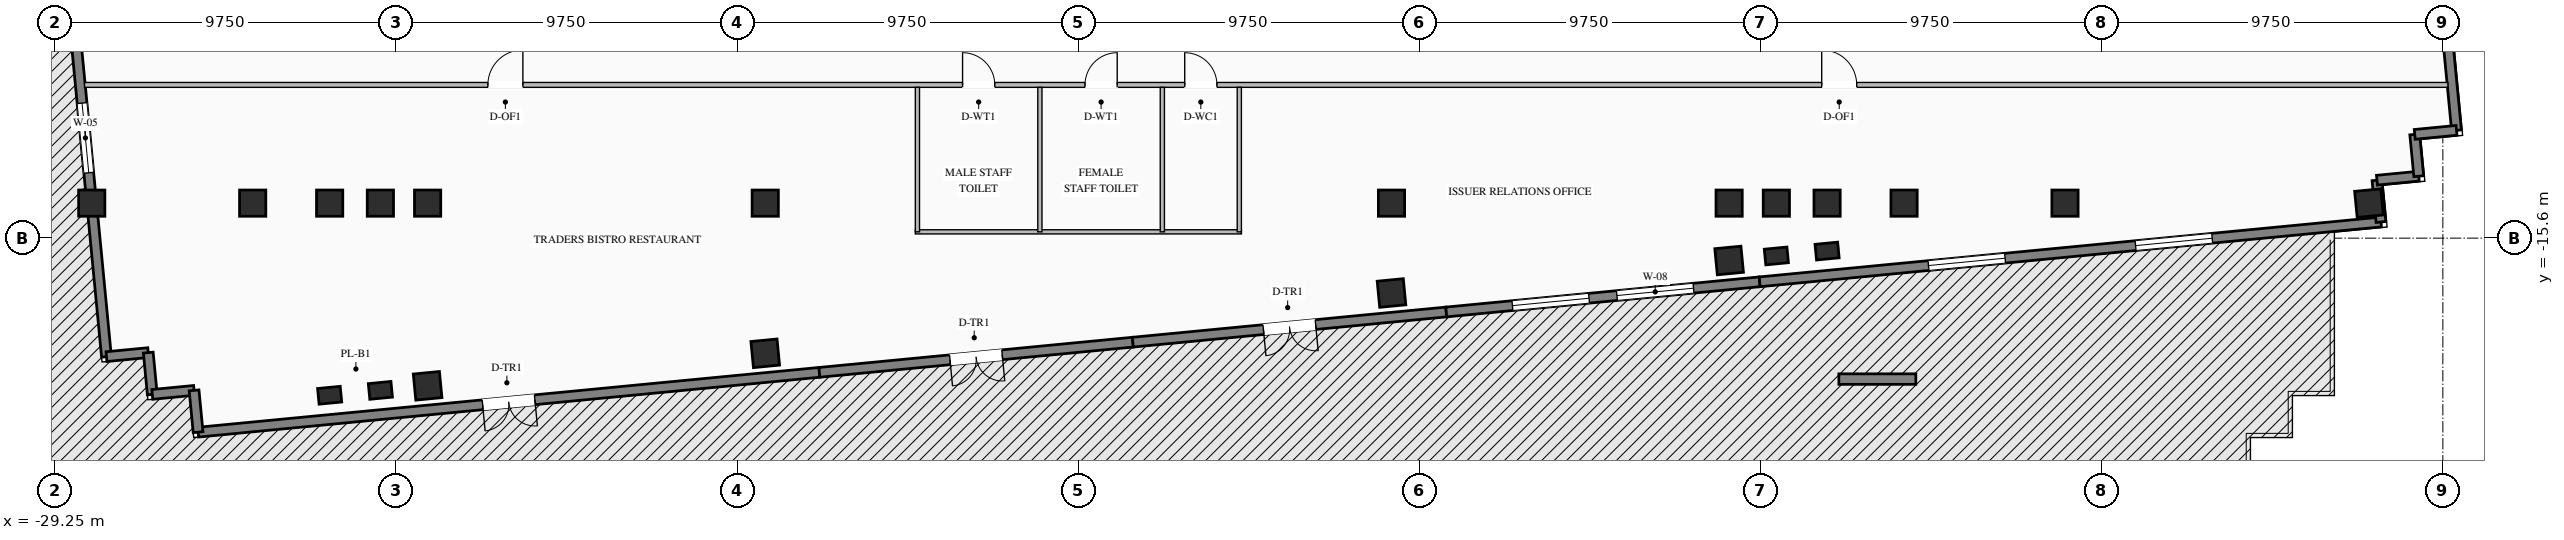
"""IFC4 building model, lengths in metres.
Left out: names, types, materials, properties, quantities, classifications, styles, units other than length and angle.
Written with IfcOpenShell. Run it as: python <this file> out.ifc"""

import sys

from ifc_helpers import new_model, si_unit, direction, frame, frame_2d, origin, origin_2d, place, context, subcontext, project, spatial, rectangle, i_section, extrude, element, fill, save


model = new_model("IFC4")
c1 = context("Model", 3, precision=1e-05, world=origin(), true_north=direction((0.0, 1.0)))
c2 = subcontext(c1, "Body", "Model", "MODEL_VIEW")
j1 = project(units=[si_unit("LENGTHUNIT", "METRE"), si_unit("PLANEANGLEUNIT", "RADIAN")], contexts=[c1])
p1 = place(None, origin())
s1 = spatial("IfcSite", under=j1, at=p1, CompositionType="ELEMENT")
p2 = place(p1, origin())
s2 = spatial("IfcBuilding", under=s1, at=p2, CompositionType="ELEMENT")
p3 = place(p2, frame((0.0, 0.0, 70.0)))
s3 = spatial("IfcBuildingStorey", under=s2, at=p3, CompositionType="ELEMENT", Elevation=70.0)
for number, where, z_axis, x_axis in (
    (1, (-21.4, -14.6, 0.0), (0.0, 0.0, 1.0), (1.0, 0.0, 0.0)),
    (2, (-19.95, -14.6, 0.0), (0.0, 0.0, 1.0), (1.0, 0.0, 0.0)),
    (3, (-18.6, -14.6, 0.0), (0.0, 0.0, 1.0), (1.0, 0.0, 0.0)),
    (4, (-8.95, -14.6, 0.0), (0.0, 0.0, 1.0), (1.0, 0.0, 0.0)),
    (5, (8.95, -14.6, 0.0), (0.0, 0.0, 1.0), (1.0, 0.0, 0.0)),
    (6, (18.6, -14.6, 0.0), (0.0, 0.0, 1.0), (1.0, 0.0, 0.0)),
    (7, (19.95, -14.6, 0.0), (0.0, 0.0, 1.0), (1.0, 0.0, 0.0)),
    (8, (21.4, -14.6, 0.0), (0.0, 0.0, 1.0), (1.0, 0.0, 0.0)),
    (9, (-23.6, -14.6, 0.0), (0.0, 0.0, 1.0), (1.0, 0.0, 0.0)),
    (10, (23.6, -14.6, 0.0), (0.0, 0.0, 1.0), (1.0, 0.0, 0.0)),
    (11, (-28.2, -14.6, 0.0), (0.0, 0.0, 1.0), (1.0, 0.0, 0.0)),
    (12, (28.2, -14.6, 0.0), (0.0, 0.0, 1.0), (1.0, 0.0, 0.0)),
):
    element("IfcColumn", number, at=place(p3, frame(where, z_axis=z_axis, x_axis=x_axis)), inside=s3, PredefinedType="COLUMN", context=c2, shape_type="SweptSolid", body=[
        extrude(i_section(OverallWidth=0.75, OverallDepth=0.75, WebThickness=0.03, FlangeThickness=0.044, at=origin_2d()), origin(), (0.0, 0.0, 1.0), 4.2),
    ])
for number, where, z_axis, x_axis in (
    (13, (-18.6, -19.821, -0.28), (0.0, 0.0, 1.0), (0.995, 0.096, 0.0)),
    (14, (-8.95, -18.892, -0.28), (0.0, 0.0, 1.0), (0.995, 0.096, 0.0)),
    (15, (8.95, -17.168, -0.28), (0.0, 0.0, 1.0), (0.995, 0.096, 0.0)),
    (16, (18.6, -16.239, -0.28), (0.0, 0.0, 1.0), (0.995, 0.096, 0.0)),
    (17, (36.888, -14.6, -0.28), (0.0, 0.0, 1.0), (0.995, 0.096, 0.0)),
):
    element("IfcColumn", number, at=place(p3, frame(where, z_axis=z_axis, x_axis=x_axis)), inside=s3, PredefinedType="COLUMN", context=c2, shape_type="SweptSolid", body=[
        extrude(i_section(OverallWidth=0.75, OverallDepth=0.75, WebThickness=0.03, FlangeThickness=0.044, at=origin_2d()), origin(), (0.0, 0.0, 1.0), 4.48),
    ])
for number, where, z_axis, x_axis in (
    (18, (-21.4, -20.091, -0.28), (0.0, 0.0, 1.0), (0.995, 0.096, 0.0)),
    (19, (-19.95, -19.951, -0.28), (0.0, 0.0, 1.0), (0.995, 0.096, 0.0)),
    (20, (19.95, -16.109, -0.28), (0.0, 0.0, 1.0), (0.995, 0.096, 0.0)),
    (21, (21.4, -15.969, -0.28), (0.0, 0.0, 1.0), (0.995, 0.096, 0.0)),
):
    element("IfcColumn", number, at=place(p3, frame(where, z_axis=z_axis, x_axis=x_axis)), inside=s3, PredefinedType="PILASTER", context=c2, shape_type="SweptSolid", body=[
        extrude(rectangle(XDim=0.65, YDim=0.45, at=origin_2d()), origin(), (0.0, 0.0, 1.0), 4.48),
    ])
p4 = place(p3, frame((-7.402, -19.436, 0.0), z_axis=(0.0, 0.0, 1.0), x_axis=(-0.995395780835, -0.095850088663, 0.0)))
e22 = element("IfcWall", 22, at=p4, inside=s3, PredefinedType="STANDARD", context=c2, shape_type="SweptSolid", body=[
    extrude(rectangle(XDim=17.84, YDim=0.28, at=frame_2d((8.92, 0.0))), origin(), (0.0, 0.0, 1.0), 4.0),
])
p5 = place(p4, frame((8.17, 0.0, 0.0)))
e23 = element("IfcOpeningElement", 23, at=p5, cuts=e22, PredefinedType="OPENING", context=c2, shape_type="SweptSolid", body=[
    extrude(rectangle(XDim=1.5, YDim=2.15, at=frame_2d((0.75, 1.075))), frame((0.0, 0.15, 0.0), z_axis=(0.0, -1.0, 0.0), x_axis=(1.0, 0.0, 0.0)), (0.0, 0.0, 1.0), 0.3),
])
p6 = place(p3, frame((1.556, -18.573, 0.0), z_axis=(0.0, 0.0, 1.0), x_axis=(-0.995396794462, -0.09583956164, 0.0)))
e24 = element("IfcWall", 24, at=p6, inside=s3, PredefinedType="STANDARD", context=c2, shape_type="SweptSolid", body=[
    extrude(rectangle(XDim=9.0, YDim=0.28, at=frame_2d((4.5, 0.0))), origin(), (0.0, 0.0, 1.0), 4.0),
])
p7 = place(p6, frame((3.75, 0.0, 0.0)))
e25 = element("IfcOpeningElement", 25, at=p7, cuts=e24, PredefinedType="OPENING", context=c2, shape_type="SweptSolid", body=[
    extrude(rectangle(XDim=1.5, YDim=2.15, at=frame_2d((0.75, 1.075))), frame((0.0, 0.15, 0.0), z_axis=(0.0, -1.0, 0.0), x_axis=(1.0, 0.0, 0.0)), (0.0, 0.0, 1.0), 0.3),
])
p8 = place(p3, frame((10.515, -17.711, 0.0), z_axis=(0.0, 0.0, 1.0), x_axis=(-0.995397043619, -0.095836973841, 0.0)))
e26 = element("IfcWall", 26, at=p8, inside=s3, PredefinedType="STANDARD", context=c2, shape_type="SweptSolid", body=[
    extrude(rectangle(XDim=9.0, YDim=0.28, at=frame_2d((4.5, 0.0))), origin(), (0.0, 0.0, 1.0), 4.0),
])
p9 = place(p8, frame((3.75, 0.0, 0.0)))
e27 = element("IfcOpeningElement", 27, at=p9, cuts=e26, PredefinedType="OPENING", context=c2, shape_type="SweptSolid", body=[
    extrude(rectangle(XDim=1.5, YDim=2.15, at=frame_2d((0.75, 1.075))), frame((0.0, 0.15, 0.0), z_axis=(0.0, -1.0, 0.0), x_axis=(1.0, 0.0, 0.0)), (0.0, 0.0, 1.0), 0.3),
])
p10 = place(p3, frame((19.474, -16.848, 0.0), z_axis=(0.0, 0.0, 1.0), x_axis=(-0.995396794462, -0.09583956164, 0.0)))
e28 = element("IfcWall", 28, at=p10, inside=s3, PredefinedType="STANDARD", context=c2, shape_type="SweptSolid", body=[
    extrude(rectangle(XDim=9.0, YDim=0.28, at=frame_2d((4.5, 0.0))), origin(), (0.0, 0.0, 1.0), 4.0),
])
p11 = place(p10, frame((1.9, 0.0, 0.76)))
e29 = element("IfcOpeningElement", 29, at=p11, cuts=e28, PredefinedType="OPENING", context=c2, shape_type="SweptSolid", body=[
    extrude(rectangle(XDim=2.2, YDim=2.25, at=frame_2d((1.1, 1.125))), frame((0.0, 0.15, 0.0), z_axis=(0.0, -1.0, 0.0), x_axis=(1.0, 0.0, 0.0)), (0.0, 0.0, 1.0), 0.3),
])
p12 = place(p10, frame((4.9, 0.0, 0.76)))
e30 = element("IfcOpeningElement", 30, at=p12, cuts=e28, PredefinedType="OPENING", context=c2, shape_type="SweptSolid", body=[
    extrude(rectangle(XDim=2.2, YDim=2.25, at=frame_2d((1.1, 1.125))), frame((0.0, 0.15, 0.0), z_axis=(0.0, -1.0, 0.0), x_axis=(1.0, 0.0, 0.0)), (0.0, 0.0, 1.0), 0.3),
])
p13 = place(p3, frame((37.231, -15.138, 0.0), z_axis=(0.0, 0.0, 1.0), x_axis=(-0.995395780835, -0.095850088663, 0.0)))
e31 = element("IfcWall", 31, at=p13, inside=s3, PredefinedType="STANDARD", context=c2, shape_type="SweptSolid", body=[
    extrude(rectangle(XDim=17.84, YDim=0.28, at=frame_2d((8.92, 0.0))), origin(), (0.0, 0.0, 1.0), 4.0),
])
p14 = place(p13, frame((4.847, 0.0, 0.76)))
e32 = element("IfcOpeningElement", 32, at=p14, cuts=e31, PredefinedType="OPENING", context=c2, shape_type="SweptSolid", body=[
    extrude(rectangle(XDim=2.2, YDim=2.25, at=frame_2d((1.1, 1.125))), frame((0.0, 0.15, 0.0), z_axis=(0.0, -1.0, 0.0), x_axis=(1.0, 0.0, 0.0)), (0.0, 0.0, 1.0), 0.3),
])
p15 = place(p13, frame((10.793, 0.0, 0.76)))
e33 = element("IfcOpeningElement", 33, at=p15, cuts=e31, PredefinedType="OPENING", context=c2, shape_type="SweptSolid", body=[
    extrude(rectangle(XDim=2.2, YDim=2.25, at=frame_2d((1.1, 1.125))), frame((0.0, 0.15, 0.0), z_axis=(0.0, -1.0, 0.0), x_axis=(1.0, 0.0, 0.0)), (0.0, 0.0, 1.0), 0.3),
])
p16 = place(p3, frame((-27.779, -18.987, 0.0), z_axis=(0.0, 0.0, 1.0), x_axis=(-0.095842534142, 0.995396508256, 0.0)))
e34 = element("IfcWall", 34, at=p16, inside=s3, PredefinedType="STANDARD", context=c2, shape_type="SweptSolid", body=[
    extrude(rectangle(XDim=18.84, YDim=0.28, at=frame_2d((9.42, 0.0))), origin(), (0.0, 0.0, 1.0), 4.0),
])
p17 = place(p16, frame((5.28, 0.0, 0.76)))
e35 = element("IfcOpeningElement", 35, at=p17, cuts=e34, PredefinedType="OPENING", context=c2, shape_type="SweptSolid", body=[
    extrude(rectangle(XDim=2.0, YDim=2.05, at=frame_2d((1.0, 1.025))), frame((0.0, 0.15, 0.0), z_axis=(0.0, -1.0, 0.0), x_axis=(1.0, 0.0, 0.0)), (0.0, 0.0, 1.0), 0.3),
])
p18 = place(p16, frame((11.56, 0.0, 0.76)))
e36 = element("IfcOpeningElement", 36, at=p18, cuts=e34, PredefinedType="OPENING", context=c2, shape_type="SweptSolid", body=[
    extrude(rectangle(XDim=2.0, YDim=2.05, at=frame_2d((1.0, 1.025))), frame((0.0, 0.15, 0.0), z_axis=(0.0, -1.0, 0.0), x_axis=(1.0, 0.0, 0.0)), (0.0, 0.0, 1.0), 0.3),
])
p19 = place(p3, frame((37.585, 6.234, 0.0), z_axis=(0.0, 0.0, 1.0), x_axis=(0.095841297881, -0.99539662729, 0.0)))
e37 = element("IfcWall", 37, at=p19, inside=s3, PredefinedType="STANDARD", context=c2, shape_type="SweptSolid", body=[
    extrude(rectangle(XDim=18.84, YDim=0.28, at=frame_2d((9.42, 0.0))), origin(), (0.0, 0.0, 1.0), 4.0),
])
p20 = place(p19, frame((3.73, 0.0, 0.76)))
e38 = element("IfcOpeningElement", 38, at=p20, cuts=e37, PredefinedType="OPENING", context=c2, shape_type="SweptSolid", body=[
    extrude(rectangle(XDim=2.0, YDim=2.05, at=frame_2d((1.0, 1.025))), frame((0.0, 0.15, 0.0), z_axis=(0.0, -1.0, 0.0), x_axis=(1.0, 0.0, 0.0)), (0.0, 0.0, 1.0), 0.3),
])
p21 = place(p19, frame((11.56, 0.0, 0.76)))
e39 = element("IfcOpeningElement", 39, at=p21, cuts=e37, PredefinedType="OPENING", context=c2, shape_type="SweptSolid", body=[
    extrude(rectangle(XDim=2.0, YDim=2.05, at=frame_2d((1.0, 1.025))), frame((0.0, 0.15, 0.0), z_axis=(0.0, -1.0, 0.0), x_axis=(1.0, 0.0, 0.0)), (0.0, 0.0, 1.0), 0.3),
])
for number, where, z_axis, x_axis in (
    (40, (37.231, -15.138, 0.0), (0.0, 0.0, 1.0), (-0.096, 0.995, 0.0)),
    (41, (37.116, -13.944, 0.0), (0.0, 0.0, 1.0), (0.995, 0.096, 0.0)),
):
    element("IfcWall", number, at=place(p3, frame(where, z_axis=z_axis, x_axis=x_axis)), inside=s3, PredefinedType="STANDARD", context=c2, shape_type="SweptSolid", body=[
        extrude(rectangle(XDim=1.2, YDim=0.28, at=frame_2d((0.6, 0.0))), origin(), (0.0, 0.0, 1.0), 2.195),
    ])
for number, where, z_axis, x_axis in (
    (42, (38.311, -13.829, 0.0), (0.0, 0.0, 1.0), (-0.096, 0.995, 0.0)),
    (43, (38.196, -12.635, 0.0), (0.0, 0.0, 1.0), (0.995, 0.096, 0.0)),
):
    element("IfcWall", number, at=place(p3, frame(where, z_axis=z_axis, x_axis=x_axis)), inside=s3, PredefinedType="STANDARD", context=c2, shape_type="SweptSolid", body=[
        extrude(rectangle(XDim=1.2, YDim=0.28, at=frame_2d((0.6, 0.0))), origin(), (0.0, 0.0, 1.0), 2.195),
    ])
for number, where, z_axis, x_axis in (
    (44, (-27.779, -18.987, 0.0), (0.0, 0.0, 1.0), (0.995, 0.096, 0.0)),
    (45, (-26.584, -18.872, 0.0), (0.0, 0.0, 1.0), (0.096, -0.995, 0.0)),
    (46, (-26.469, -20.067, 0.0), (0.0, 0.0, 1.0), (0.995, 0.096, 0.0)),
):
    element("IfcWall", number, at=place(p3, frame(where, z_axis=z_axis, x_axis=x_axis)), inside=s3, PredefinedType="STANDARD", context=c2, shape_type="SweptSolid", body=[
        extrude(rectangle(XDim=1.2, YDim=0.28, at=frame_2d((0.6, 0.0))), origin(), (0.0, 0.0, 1.0), 4.0),
    ])
p22 = place(p3, frame((-25.275, -19.952, 0.0), z_axis=(0.0, 0.0, 1.0), x_axis=(0.095836473879, -0.995397091755, 0.0)))
e47 = element("IfcWall", 47, at=p22, inside=s3, PredefinedType="STANDARD", context=c2, shape_type="SweptSolid", body=[
    extrude(rectangle(XDim=1.2, YDim=0.28, at=frame_2d((0.6, 0.0))), origin(), (0.0, 0.0, 1.0), 4.0),
])
p23 = place(p3, frame((21.736, -19.629, 0.0), z_axis=(0.0, 0.0, 1.0), x_axis=(1.0, 0.0, 0.0)))
e48 = element("IfcWall", 48, at=p23, inside=s3, PredefinedType="PARAPET", context=c2, shape_type="SweptSolid", body=[
    extrude(rectangle(XDim=2.2, YDim=0.3, at=frame_2d((1.1, 0.0))), origin(), (0.0, 0.0, 1.0), 0.65),
])
p24 = place(p3, frame((-28.406, -11.22, 0.0), z_axis=(0.0, 0.0, 1.0), x_axis=(1.0, 0.0, 0.0)))
e49 = element("IfcWall", 49, at=p24, inside=s3, PredefinedType="STANDARD", context=c2, shape_type="SweptSolid", body=[
    extrude(rectangle(XDim=67.551, YDim=0.14, at=frame_2d((33.775, 0.0))), origin(), (0.0, 0.0, 1.0), 3.495),
])
p25 = place(p24, frame((25.096, 0.0, 0.0)))
e50 = element("IfcOpeningElement", 50, at=p25, cuts=e49, PredefinedType="OPENING", context=c2, shape_type="SweptSolid", body=[
    extrude(rectangle(XDim=0.92, YDim=2.08, at=frame_2d((0.46, 1.04))), frame((0.0, 0.08, 0.0), z_axis=(0.0, -1.0, 0.0), x_axis=(1.0, 0.0, 0.0)), (0.0, 0.0, 1.0), 0.16),
])
p26 = place(p24, frame((28.596, 0.0, 0.0)))
e51 = element("IfcOpeningElement", 51, at=p26, cuts=e49, PredefinedType="OPENING", context=c2, shape_type="SweptSolid", body=[
    extrude(rectangle(XDim=0.92, YDim=2.08, at=frame_2d((0.46, 1.04))), frame((0.0, 0.08, 0.0), z_axis=(0.0, -1.0, 0.0), x_axis=(1.0, 0.0, 0.0)), (0.0, 0.0, 1.0), 0.16),
])
p27 = place(p24, frame((31.446, 0.0, 0.0)))
e52 = element("IfcOpeningElement", 52, at=p27, cuts=e49, PredefinedType="OPENING", context=c2, shape_type="SweptSolid", body=[
    extrude(rectangle(XDim=0.92, YDim=2.08, at=frame_2d((0.46, 1.04))), frame((0.0, 0.08, 0.0), z_axis=(0.0, -1.0, 0.0), x_axis=(1.0, 0.0, 0.0)), (0.0, 0.0, 1.0), 0.16),
])
p28 = place(p24, frame((11.529, 0.0, 0.0)))
e53 = element("IfcOpeningElement", 53, at=p28, cuts=e49, PredefinedType="OPENING", context=c2, shape_type="SweptSolid", body=[
    extrude(rectangle(XDim=1.0, YDim=2.08, at=frame_2d((0.5, 1.04))), frame((0.0, 0.08, 0.0), z_axis=(0.0, -1.0, 0.0), x_axis=(1.0, 0.0, 0.0)), (0.0, 0.0, 1.0), 0.16),
])
p29 = place(p24, frame((49.653, 0.0, 0.0)))
e54 = element("IfcOpeningElement", 54, at=p29, cuts=e49, PredefinedType="OPENING", context=c2, shape_type="SweptSolid", body=[
    extrude(rectangle(XDim=1.0, YDim=2.08, at=frame_2d((0.5, 1.04))), frame((0.0, 0.08, 0.0), z_axis=(0.0, -1.0, 0.0), x_axis=(1.0, 0.0, 0.0)), (0.0, 0.0, 1.0), 0.16),
])
p30 = place(p3, frame((-4.66, -15.42, 0.0), z_axis=(0.0, 0.0, 1.0), x_axis=(1.0, 0.0, 0.0)))
e55 = element("IfcWall", 55, at=p30, inside=s3, PredefinedType="STANDARD", context=c2, shape_type="SweptSolid", body=[
    extrude(rectangle(XDim=9.32, YDim=0.12, at=frame_2d((4.66, 0.0))), origin(), (0.0, 0.0, 1.0), 4.0),
])
for number, where, z_axis, x_axis in (
    (56, (-4.6, -15.42, 0.0), (0.0, 0.0, 1.0), (0.0, 1.0, 0.0)),
    (57, (-1.1, -15.42, 0.0), (0.0, 0.0, 1.0), (0.0, 1.0, 0.0)),
    (58, (2.4, -15.42, 0.0), (0.0, 0.0, 1.0), (0.0, 1.0, 0.0)),
    (59, (4.6, -15.42, 0.0), (0.0, 0.0, 1.0), (0.0, 1.0, 0.0)),
):
    element("IfcWall", number, at=place(p3, frame(where, z_axis=z_axis, x_axis=x_axis)), inside=s3, PredefinedType="STANDARD", context=c2, shape_type="SweptSolid", body=[
        extrude(rectangle(XDim=4.13, YDim=0.12, at=frame_2d((2.065, 0.0))), origin(), (0.0, 0.0, 1.0), 4.0),
    ])
p31 = place(p5, origin())
e60 = element("IfcDoor", 60, at=p31, inside=s3, OperationType="DOUBLE_DOOR_SINGLE_SWING", PredefinedType="DOOR", context=c2, shape_type="SweptSolid", body=[
    extrude(rectangle(XDim=1.5, YDim=2.15, at=frame_2d((0.75, 1.075))), frame((0.0, 0.025, 0.0), z_axis=(0.0, -1.0, 0.0), x_axis=(1.0, 0.0, 0.0)), (0.0, 0.0, 1.0), 0.05),
])
fill(e23, e60)
p32 = place(p7, origin())
e61 = element("IfcDoor", 61, at=p32, inside=s3, OperationType="DOUBLE_DOOR_SINGLE_SWING", PredefinedType="DOOR", context=c2, shape_type="SweptSolid", body=[
    extrude(rectangle(XDim=1.5, YDim=2.15, at=frame_2d((0.75, 1.075))), frame((0.0, 0.025, 0.0), z_axis=(0.0, -1.0, 0.0), x_axis=(1.0, 0.0, 0.0)), (0.0, 0.0, 1.0), 0.05),
])
fill(e25, e61)
p33 = place(p9, origin())
e62 = element("IfcDoor", 62, at=p33, inside=s3, OperationType="DOUBLE_DOOR_SINGLE_SWING", PredefinedType="DOOR", context=c2, shape_type="SweptSolid", body=[
    extrude(rectangle(XDim=1.5, YDim=2.15, at=frame_2d((0.75, 1.075))), frame((0.0, 0.025, 0.0), z_axis=(0.0, -1.0, 0.0), x_axis=(1.0, 0.0, 0.0)), (0.0, 0.0, 1.0), 0.05),
])
fill(e27, e62)
p34 = place(p11, origin())
e63 = element("IfcWindow", 63, at=p34, inside=s3, PartitioningType="DOUBLE_PANEL_VERTICAL", PredefinedType="WINDOW", context=c2, shape_type="SweptSolid", body=[
    extrude(rectangle(XDim=2.2, YDim=2.25, at=frame_2d((1.1, 1.125))), frame((0.0, 0.03, 0.0), z_axis=(0.0, -1.0, 0.0), x_axis=(1.0, 0.0, 0.0)), (0.0, 0.0, 1.0), 0.06),
])
fill(e29, e63)
p35 = place(p12, origin())
e64 = element("IfcWindow", 64, at=p35, inside=s3, PartitioningType="DOUBLE_PANEL_VERTICAL", PredefinedType="WINDOW", context=c2, shape_type="SweptSolid", body=[
    extrude(rectangle(XDim=2.2, YDim=2.25, at=frame_2d((1.1, 1.125))), frame((0.0, 0.03, 0.0), z_axis=(0.0, -1.0, 0.0), x_axis=(1.0, 0.0, 0.0)), (0.0, 0.0, 1.0), 0.06),
])
fill(e30, e64)
p36 = place(p14, origin())
e65 = element("IfcWindow", 65, at=p36, inside=s3, PartitioningType="DOUBLE_PANEL_VERTICAL", PredefinedType="WINDOW", context=c2, shape_type="SweptSolid", body=[
    extrude(rectangle(XDim=2.2, YDim=2.25, at=frame_2d((1.1, 1.125))), frame((0.0, 0.03, 0.0), z_axis=(0.0, -1.0, 0.0), x_axis=(1.0, 0.0, 0.0)), (0.0, 0.0, 1.0), 0.06),
])
fill(e32, e65)
p37 = place(p15, origin())
e66 = element("IfcWindow", 66, at=p37, inside=s3, PartitioningType="DOUBLE_PANEL_VERTICAL", PredefinedType="WINDOW", context=c2, shape_type="SweptSolid", body=[
    extrude(rectangle(XDim=2.2, YDim=2.25, at=frame_2d((1.1, 1.125))), frame((0.0, 0.03, 0.0), z_axis=(0.0, -1.0, 0.0), x_axis=(1.0, 0.0, 0.0)), (0.0, 0.0, 1.0), 0.06),
])
fill(e33, e66)
p38 = place(p17, origin())
e67 = element("IfcWindow", 67, at=p38, inside=s3, PartitioningType="DOUBLE_PANEL_VERTICAL", PredefinedType="WINDOW", context=c2, shape_type="SweptSolid", body=[
    extrude(rectangle(XDim=2.0, YDim=2.05, at=frame_2d((1.0, 1.025))), frame((0.0, 0.03, 0.0), z_axis=(0.0, -1.0, 0.0), x_axis=(1.0, 0.0, 0.0)), (0.0, 0.0, 1.0), 0.06),
])
fill(e35, e67)
p39 = place(p25, origin())
e68 = element("IfcDoor", 68, at=p39, inside=s3, OperationType="SINGLE_SWING_LEFT", PredefinedType="DOOR", context=c2, shape_type="SweptSolid", body=[
    extrude(rectangle(XDim=0.92, YDim=2.08, at=frame_2d((0.46, 1.04))), frame((0.0, 0.025, 0.0), z_axis=(0.0, -1.0, 0.0), x_axis=(1.0, 0.0, 0.0)), (0.0, 0.0, 1.0), 0.05),
])
fill(e50, e68)
p40 = place(p26, origin())
e69 = element("IfcDoor", 69, at=p40, inside=s3, OperationType="SINGLE_SWING_RIGHT", PredefinedType="DOOR", context=c2, shape_type="SweptSolid", body=[
    extrude(rectangle(XDim=0.92, YDim=2.08, at=frame_2d((0.46, 1.04))), frame((0.0, 0.025, 0.0), z_axis=(0.0, -1.0, 0.0), x_axis=(1.0, 0.0, 0.0)), (0.0, 0.0, 1.0), 0.05),
])
fill(e51, e69)
p41 = place(p27, origin())
e70 = element("IfcDoor", 70, at=p41, inside=s3, OperationType="SINGLE_SWING_LEFT", PredefinedType="DOOR", context=c2, shape_type="SweptSolid", body=[
    extrude(rectangle(XDim=0.92, YDim=2.08, at=frame_2d((0.46, 1.04))), frame((0.0, 0.025, 0.0), z_axis=(0.0, -1.0, 0.0), x_axis=(1.0, 0.0, 0.0)), (0.0, 0.0, 1.0), 0.05),
])
fill(e52, e70)
p42 = place(p28, origin())
e71 = element("IfcDoor", 71, at=p42, inside=s3, OperationType="SINGLE_SWING_RIGHT", PredefinedType="DOOR", context=c2, shape_type="SweptSolid", body=[
    extrude(rectangle(XDim=1.0, YDim=2.08, at=frame_2d((0.5, 1.04))), frame((0.0, 0.025, 0.0), z_axis=(0.0, -1.0, 0.0), x_axis=(1.0, 0.0, 0.0)), (0.0, 0.0, 1.0), 0.05),
])
fill(e53, e71)
p43 = place(p29, origin())
e72 = element("IfcDoor", 72, at=p43, inside=s3, OperationType="SINGLE_SWING_LEFT", PredefinedType="DOOR", context=c2, shape_type="SweptSolid", body=[
    extrude(rectangle(XDim=1.0, YDim=2.08, at=frame_2d((0.5, 1.04))), frame((0.0, 0.025, 0.0), z_axis=(0.0, -1.0, 0.0), x_axis=(1.0, 0.0, 0.0)), (0.0, 0.0, 1.0), 0.05),
])
fill(e54, e72)
save(model, sys.argv[1])
